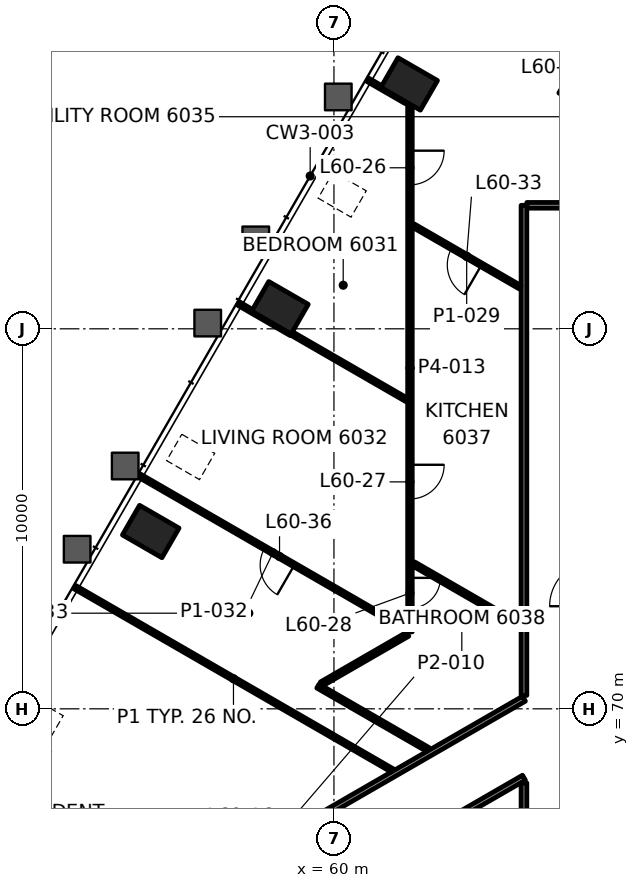
"""IFC4 building model, lengths in metres.
Left out: names, types, materials, properties, quantities, classifications, styles, units other than length and angle.
Written with IfcOpenShell. Run it as: python <this file> out.ifc"""

import sys

from ifc_helpers import new_model, si_unit, direction, frame, frame_2d, origin, origin_2d, place, context, subcontext, project, spatial, rectangle, hollow_rectangle, extrude, element, fill, save


model = new_model("IFC4")
c1 = context("Model", 3, precision=1e-05, world=origin(), true_north=direction((0.0, 1.0)))
c2 = subcontext(c1, "Body", "Model", "MODEL_VIEW")
j1 = project(units=[si_unit("LENGTHUNIT", "METRE"), si_unit("PLANEANGLEUNIT", "RADIAN")], contexts=[c1])
p1 = place(None, origin())
s1 = spatial("IfcSite", under=j1, at=p1, CompositionType="ELEMENT")
p2 = place(p1, origin())
s2 = spatial("IfcBuilding", under=s1, at=p2, CompositionType="ELEMENT")
p3 = place(p2, frame((0.0, 0.0, 256.6)))
s3 = spatial("IfcBuildingStorey", under=s2, at=p3, CompositionType="ELEMENT", Elevation=256.6)
for number, where, z_axis, x_axis in (
    (1, (61.979, 86.443, -0.0), (0.0, 0.0, 1.0), (-0.5, -0.866, 0.0)),
    (2, (58.579, 80.554, -0.0), (0.0, 0.0, 1.0), (-0.5, -0.866, 0.0)),
    (3, (55.179, 74.666, -0.0), (0.0, 0.0, 1.0), (-0.5, -0.866, 0.0)),
):
    element("IfcColumn", number, at=place(p3, frame(where, z_axis=z_axis, x_axis=x_axis)), inside=s3, PredefinedType="COLUMN", context=c2, shape_type="SweptSolid", body=[
        extrude(hollow_rectangle(XDim=0.9, YDim=1.2, WallThickness=0.06, at=origin_2d()), origin(), (0.0, 0.0, 1.0), 3.5),
    ])
p4 = place(p3, frame((65.075, 83.25, 0.0), z_axis=(0.0, 0.0, 1.0), x_axis=(1.0, 0.0, 0.0)))
e4 = element("IfcWall", 4, at=p4, inside=s3, PredefinedType="PARTITIONING", context=c2, shape_type="SweptSolid", body=[
    extrude(rectangle(XDim=6.725, YDim=0.15, at=frame_2d((3.362, 0.0))), origin(), (0.0, 0.0, 1.0), 2.7),
])
p5 = place(p4, frame((2.632, 0.0, 0.0)))
e5 = element("IfcOpeningElement", 5, at=p5, cuts=e4, PredefinedType="OPENING", context=c2, shape_type="SweptSolid", body=[
    extrude(rectangle(XDim=1.0, YDim=2.1, at=frame_2d((0.5, 1.05))), frame((0.0, 0.085, 0.0), z_axis=(0.0, -1.0, 0.0), x_axis=(1.0, 0.0, 0.0)), (0.0, 0.0, 1.0), 0.17),
])
p6 = place(p3, frame((65.0, 68.187, 0.0), z_axis=(0.0, 0.0, 1.0), x_axis=(-0.866027660432, -0.499996091351, 0.0)))
e6 = element("IfcWall", 6, at=p6, inside=s3, PredefinedType="PARTITIONING", context=c2, shape_type="SweptSolid", body=[
    extrude(rectangle(XDim=14.494, YDim=0.15, at=frame_2d((7.247, 0.0))), origin(), (0.0, 0.0, 1.0), 2.547),
])
p7 = place(p6, frame((6.324, 0.0, 0.0)))
e7 = element("IfcOpeningElement", 7, at=p7, cuts=e6, PredefinedType="OPENING", context=c2, shape_type="SweptSolid", body=[
    extrude(rectangle(XDim=0.9, YDim=2.1, at=frame_2d((0.45, 1.05))), frame((0.0, 0.085, 0.0), z_axis=(0.0, -1.0, 0.0), x_axis=(1.0, 0.0, 0.0)), (0.0, 0.0, 1.0), 0.17),
])
p8 = place(p6, frame((12.004, 0.0, 0.0)))
e8 = element("IfcOpeningElement", 8, at=p8, cuts=e6, PredefinedType="OPENING", context=c2, shape_type="SweptSolid", body=[
    extrude(rectangle(XDim=0.9, YDim=2.1, at=frame_2d((0.45, 1.05))), frame((0.0, 0.085, 0.0), z_axis=(0.0, -1.0, 0.0), x_axis=(1.0, 0.0, 0.0)), (0.0, 0.0, 1.0), 0.17),
])
p9 = place(p3, frame((51.549, 62.5, 0.0), z_axis=(0.0, 0.0, 1.0), x_axis=(0.866020420161, 0.50000863179, 0.0)))
e9 = element("IfcWall", 9, at=p9, inside=s3, PredefinedType="PARTITIONING", context=c2, shape_type="SweptSolid", body=[
    extrude(rectangle(XDim=15.532, YDim=0.15, at=frame_2d((7.766, 0.0))), origin(), (0.0, 0.0, 1.0), 2.7),
])
p10 = place(p9, frame((5.474, 0.0, 0.0)))
e10 = element("IfcOpeningElement", 10, at=p10, cuts=e9, PredefinedType="OPENING", context=c2, shape_type="SweptSolid", body=[
    extrude(rectangle(XDim=0.9, YDim=2.1, at=frame_2d((0.45, 1.05))), frame((0.0, 0.085, 0.0), z_axis=(0.0, -1.0, 0.0), x_axis=(1.0, 0.0, 0.0)), (0.0, 0.0, 1.0), 0.17),
])
p11 = place(p3, frame((59.673, 70.655, 0.0), z_axis=(0.0, 0.0, 1.0), x_axis=(0.866053563643, 0.499951222523, 0.0)))
e11 = element("IfcWall", 11, at=p11, inside=s3, PredefinedType="PARTITIONING", context=c2, shape_type="SweptSolid", body=[
    extrude(rectangle(XDim=2.617, YDim=0.12, at=frame_2d((1.309, 0.0))), origin(), (0.0, 0.0, 1.0), 2.7),
])
p12 = place(p3, frame((65.0, 66.825, 0.0), z_axis=(0.0, 0.0, 1.0), x_axis=(0.0, 1.0, 0.0)))
e12 = element("IfcWall", 12, at=p12, inside=s3, PredefinedType="PARTITIONING", context=c2, shape_type="SweptSolid", body=[
    extrude(rectangle(XDim=1.226, YDim=0.15, at=frame_2d((0.613, 0.0))), origin(), (0.0, 0.0, 1.0), 2.547),
])
p13 = place(p3, frame((65.0, 70.352, 0.0), z_axis=(0.0, 0.0, 1.0), x_axis=(0.0, 1.0, 0.0)))
e13 = element("IfcWall", 13, at=p13, inside=s3, PredefinedType="PARTITIONING", context=c2, shape_type="SweptSolid", body=[
    extrude(rectangle(XDim=12.897, YDim=0.15, at=frame_2d((6.449, 0.0))), origin(), (0.0, 0.0, 1.0), 2.7),
])
p14 = place(p3, frame((62.0, 85.912, 0.0), z_axis=(0.0, 0.0, 1.0), x_axis=(0.0, -1.0, 0.0)))
e14 = element("IfcWall", 14, at=p14, inside=s3, PredefinedType="PARTITIONING", context=c2, shape_type="SweptSolid", body=[
    extrude(rectangle(XDim=13.888, YDim=0.12, at=frame_2d((6.944, 0.0))), origin(), (0.0, 0.0, 1.0), 2.7),
])
p15 = place(p14, frame((1.224, 0.0, 0.0)))
e15 = element("IfcOpeningElement", 15, at=p15, cuts=e14, PredefinedType="OPENING", context=c2, shape_type="SweptSolid", body=[
    extrude(rectangle(XDim=0.9, YDim=2.1, at=frame_2d((0.45, 1.05))), frame((0.0, 0.07, 0.0), z_axis=(0.0, -1.0, 0.0), x_axis=(1.0, 0.0, 0.0)), (0.0, 0.0, 1.0), 0.14),
])
p16 = place(p14, frame((9.49, 0.0, 0.0)))
e16 = element("IfcOpeningElement", 16, at=p16, cuts=e14, PredefinedType="OPENING", context=c2, shape_type="SweptSolid", body=[
    extrude(rectangle(XDim=0.9, YDim=2.1, at=frame_2d((0.45, 1.05))), frame((0.0, 0.07, 0.0), z_axis=(0.0, -1.0, 0.0), x_axis=(1.0, 0.0, 0.0)), (0.0, 0.0, 1.0), 0.14),
])
p17 = place(p14, frame((12.466, 0.0, 0.0)))
e17 = element("IfcOpeningElement", 17, at=p17, cuts=e14, PredefinedType="OPENING", context=c2, shape_type="SweptSolid", body=[
    extrude(rectangle(XDim=0.8, YDim=2.1, at=frame_2d((0.4, 1.05))), frame((0.0, 0.07, 0.0), z_axis=(0.0, -1.0, 0.0), x_axis=(1.0, 0.0, 0.0)), (0.0, 0.0, 1.0), 0.14),
])
p18 = place(p3, frame((70.929, 83.37, 0.0), z_axis=(0.0, 0.0, 1.0), x_axis=(-0.866032366698, 0.499987939687, 0.0)))
e18 = element("IfcWall", 18, at=p18, inside=s3, PredefinedType="PARTITIONING", context=c2, shape_type="SweptSolid", body=[
    extrude(rectangle(XDim=5.758, YDim=0.1, at=frame_2d((2.879, 0.0))), origin(), (0.0, 0.0, 1.0), 2.7),
])
p19 = place(p3, frame((61.901, 85.969, 0.0), z_axis=(0.0, 0.0, 1.0), x_axis=(-0.866102146699, 0.499867053809, 0.0)))
e19 = element("IfcWall", 19, at=p19, inside=s3, PredefinedType="PARTITIONING", context=c2, shape_type="SweptSolid", body=[
    extrude(rectangle(XDim=1.169, YDim=0.1, at=frame_2d((0.584, 0.0))), origin(), (0.0, 0.0, 1.0), 2.688),
])
p20 = place(p3, frame((64.899, 81.094, 0.0), z_axis=(0.0, 0.0, 1.0), x_axis=(-0.866032882975, 0.499987045439, 0.0)))
e20 = element("IfcWall", 20, at=p20, inside=s3, PredefinedType="PARTITIONING", context=c2, shape_type="SweptSolid", body=[
    extrude(rectangle(XDim=3.248, YDim=0.1, at=frame_2d((1.624, 0.0))), origin(), (0.0, 0.0, 1.0), 2.7),
])
p21 = place(p20, frame((1.174, 0.0, 0.0)))
e21 = element("IfcOpeningElement", 21, at=p21, cuts=e20, PredefinedType="OPENING", context=c2, shape_type="SweptSolid", body=[
    extrude(rectangle(XDim=0.9, YDim=2.1, at=frame_2d((0.45, 1.05))), frame((0.0, 0.06, 0.0), z_axis=(0.0, -1.0, 0.0), x_axis=(1.0, 0.0, 0.0)), (0.0, 0.0, 1.0), 0.12),
])
p22 = place(p3, frame((61.914, 78.129, 0.0), z_axis=(0.0, 0.0, 1.0), x_axis=(-0.866011380966, 0.500024287448, 0.0)))
e22 = element("IfcWall", 22, at=p22, inside=s3, PredefinedType="PARTITIONING", context=c2, shape_type="SweptSolid", body=[
    extrude(rectangle(XDim=3.501, YDim=0.1, at=frame_2d((1.75, 0.0))), origin(), (0.0, 0.0, 1.0), 2.7),
])
p23 = place(p3, frame((58.874, 79.865, 0.0), z_axis=(0.0, 0.0, 1.0), x_axis=(-0.865989903783, 0.500061482766, 0.0)))
e23 = element("IfcWall", 23, at=p23, inside=s3, PredefinedType="PARTITIONING", context=c2, shape_type="SweptSolid", body=[
    extrude(rectangle(XDim=1.6, YDim=0.1, at=frame_2d((0.8, 0.0))), origin(), (0.0, 0.0, 1.0), 2.688),
])
p24 = place(p3, frame((64.89, 72.2, 0.0), z_axis=(0.0, 0.0, 1.0), x_axis=(-0.866033195618, 0.499986503906, 0.0)))
e24 = element("IfcWall", 24, at=p24, inside=s3, PredefinedType="PARTITIONING", context=c2, shape_type="SweptSolid", body=[
    extrude(rectangle(XDim=3.228, YDim=0.12, at=frame_2d((1.614, 0.0))), origin(), (0.0, 0.0, 1.0), 2.7),
])
p25 = place(p3, frame((61.914, 72.076, 0.0), z_axis=(0.0, 0.0, 1.0), x_axis=(-0.866023498866, 0.500003299401, 0.0)))
e25 = element("IfcWall", 25, at=p25, inside=s3, PredefinedType="PARTITIONING", context=c2, shape_type="SweptSolid", body=[
    extrude(rectangle(XDim=8.127, YDim=0.1, at=frame_2d((4.063, 0.0))), origin(), (0.0, 0.0, 1.0), 2.688),
])
p26 = place(p25, frame((3.413, 0.0, 0.0)))
e26 = element("IfcOpeningElement", 26, at=p26, cuts=e25, PredefinedType="OPENING", context=c2, shape_type="SweptSolid", body=[
    extrude(rectangle(XDim=0.9, YDim=2.1, at=frame_2d((0.45, 1.05))), frame((0.0, 0.06, 0.0), z_axis=(0.0, -1.0, 0.0), x_axis=(1.0, 0.0, 0.0)), (0.0, 0.0, 1.0), 0.12),
])
p27 = place(p3, frame((62.469, 68.931, 0.0), z_axis=(0.0, 0.0, 1.0), x_axis=(-0.866033317326, 0.499986293093, 0.0)))
e27 = element("IfcWall", 27, at=p27, inside=s3, PredefinedType="PARTITIONING", context=c2, shape_type="SweptSolid", body=[
    extrude(rectangle(XDim=3.337, YDim=0.12, at=frame_2d((1.669, 0.0))), origin(), (0.0, 0.0, 1.0), 2.7),
])
p28 = place(p3, frame((61.532, 68.38, 0.0), z_axis=(0.0, 0.0, 1.0), x_axis=(-0.866022444854, 0.500005124982, 0.0)))
e28 = element("IfcWall", 28, at=p28, inside=s3, PredefinedType="PARTITIONING", context=c2, shape_type="SweptSolid", body=[
    extrude(rectangle(XDim=9.645, YDim=0.1, at=frame_2d((4.822, 0.0))), origin(), (0.0, 0.0, 1.0), 2.7),
])
p29 = place(p15, origin())
e29 = element("IfcDoor", 29, at=p29, inside=s3, OperationType="SINGLE_SWING_RIGHT", PredefinedType="DOOR", context=c2, shape_type="SweptSolid", body=[
    extrude(rectangle(XDim=0.9, YDim=2.1, at=frame_2d((0.45, 1.05))), frame((0.0, 0.025, 0.0), z_axis=(0.0, -1.0, 0.0), x_axis=(1.0, 0.0, 0.0)), (0.0, 0.0, 1.0), 0.05),
])
fill(e15, e29)
p30 = place(p16, origin())
e30 = element("IfcDoor", 30, at=p30, inside=s3, OperationType="SINGLE_SWING_RIGHT", PredefinedType="DOOR", context=c2, shape_type="SweptSolid", body=[
    extrude(rectangle(XDim=0.9, YDim=2.1, at=frame_2d((0.45, 1.05))), frame((0.0, 0.025, 0.0), z_axis=(0.0, -1.0, 0.0), x_axis=(1.0, 0.0, 0.0)), (0.0, 0.0, 1.0), 0.05),
])
fill(e16, e30)
p31 = place(p17, origin())
e31 = element("IfcDoor", 31, at=p31, inside=s3, OperationType="SINGLE_SWING_RIGHT", PredefinedType="DOOR", context=c2, shape_type="SweptSolid", body=[
    extrude(rectangle(XDim=0.8, YDim=2.1, at=frame_2d((0.4, 1.05))), frame((0.0, 0.025, 0.0), z_axis=(0.0, -1.0, 0.0), x_axis=(1.0, 0.0, 0.0)), (0.0, 0.0, 1.0), 0.05),
])
fill(e17, e31)
p32 = place(p21, origin())
e32 = element("IfcDoor", 32, at=p32, inside=s3, OperationType="SINGLE_SWING_RIGHT", PredefinedType="DOOR", context=c2, shape_type="SweptSolid", body=[
    extrude(rectangle(XDim=0.9, YDim=2.1, at=frame_2d((0.45, 1.05))), frame((0.0, 0.025, 0.0), z_axis=(0.0, -1.0, 0.0), x_axis=(1.0, 0.0, 0.0)), (0.0, 0.0, 1.0), 0.05),
])
fill(e21, e32)
p33 = place(p26, origin())
e33 = element("IfcDoor", 33, at=p33, inside=s3, OperationType="SINGLE_SWING_RIGHT", PredefinedType="DOOR", context=c2, shape_type="SweptSolid", body=[
    extrude(rectangle(XDim=0.9, YDim=2.1, at=frame_2d((0.45, 1.05))), frame((0.0, 0.025, 0.0), z_axis=(0.0, -1.0, 0.0), x_axis=(1.0, 0.0, 0.0)), (0.0, 0.0, 1.0), 0.05),
])
fill(e26, e33)
save(model, sys.argv[1])
